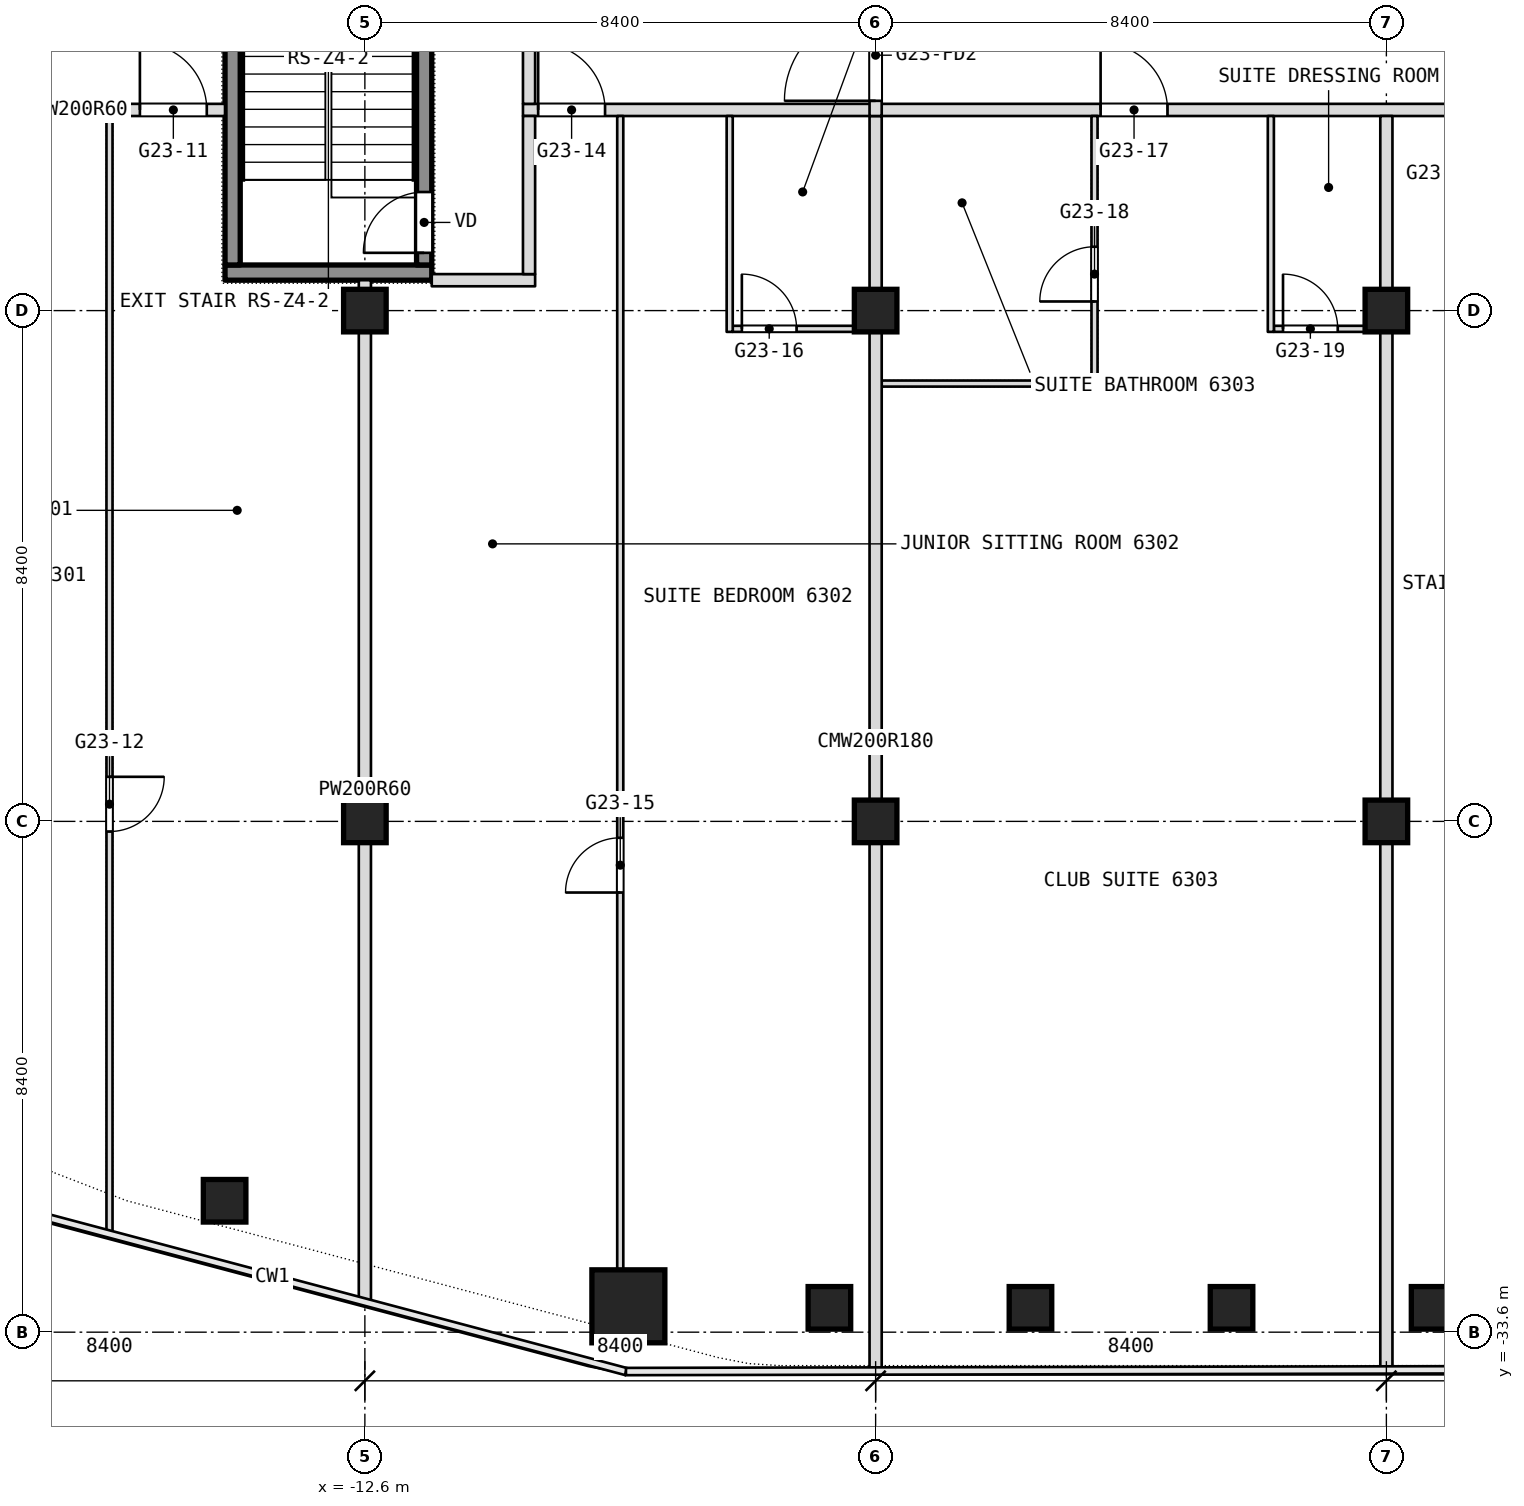
"""IFC4 building model, lengths in metres.
Left out: names, types, materials, properties, quantities, classifications, styles, units other than length and angle.
Written with IfcOpenShell. Run it as: python <this file> out.ifc"""

import sys

from ifc_helpers import new_model, si_unit, direction, frame, frame_2d, origin, origin_2d, place, context, subcontext, project, spatial, rectangle, extrude, element, fill, save


model = new_model("IFC4")
c1 = context("Model", 3, precision=1e-05, world=origin(), true_north=direction((0.0, 1.0)))
c2 = subcontext(c1, "Body", "Model", "MODEL_VIEW")
j1 = project(units=[si_unit("LENGTHUNIT", "METRE"), si_unit("PLANEANGLEUNIT", "RADIAN")], contexts=[c1])
p1 = place(None, origin())
s1 = spatial("IfcSite", under=j1, at=p1, CompositionType="ELEMENT")
p2 = place(p1, origin())
s2 = spatial("IfcBuilding", under=s1, at=p2, CompositionType="ELEMENT")
p3 = place(p2, frame((0.0, 0.0, 274.1)))
s3 = spatial("IfcBuildingStorey", under=s2, at=p3, CompositionType="ELEMENT", Elevation=274.1)
p4 = place(p3, frame((-8.266, -33.175, 0.0), z_axis=(0.0, 0.0, 1.0), x_axis=(1.0, 0.0, 0.0)))
e1 = element("IfcColumn", 1, at=p4, inside=s3, PredefinedType="COLUMN", context=c2, shape_type="SweptSolid", body=[
    extrude(rectangle(XDim=1.2, YDim=1.2, at=origin_2d()), origin(), (0.0, 0.0, 1.0), 3.6),
])
for number, where, z_axis, x_axis in (
    (2, (-12.6, -25.2, 0.0), (0.0, 0.0, 1.0), (1.0, 0.0, 0.0)),
    (3, (-12.6, -16.8, 0.0), (0.0, 0.0, 1.0), (1.0, 0.0, 0.0)),
    (4, (-4.2, -25.2, 0.0), (0.0, 0.0, 1.0), (1.0, 0.0, 0.0)),
    (5, (-4.2, -16.8, 0.0), (0.0, 0.0, 1.0), (1.0, 0.0, 0.0)),
    (6, (4.2, -25.2, 0.0), (0.0, 0.0, 1.0), (1.0, 0.0, 0.0)),
    (7, (4.2, -16.8, 0.0), (0.0, 0.0, 1.0), (1.0, 0.0, 0.0)),
    (8, (4.96, -33.2, 0.0), (0.0, 0.0, 1.0), (1.0, 0.0, 0.0)),
    (9, (1.653, -33.2, 0.0), (0.0, 0.0, 1.0), (1.0, 0.0, 0.0)),
    (10, (-1.653, -33.2, 0.0), (0.0, 0.0, 1.0), (1.0, 0.0, 0.0)),
    (11, (-4.96, -33.2, 0.0), (0.0, 0.0, 1.0), (1.0, 0.0, 0.0)),
    (12, (-14.907, -31.439, 0.0), (0.0, 0.0, 1.0), (1.0, 0.0, 0.0)),
):
    element("IfcColumn", number, at=place(p3, frame(where, z_axis=z_axis, x_axis=x_axis)), inside=s3, PredefinedType="COLUMN", context=c2, shape_type="SweptSolid", body=[
        extrude(rectangle(XDim=0.7, YDim=0.7, at=origin_2d()), origin(), (0.0, 0.0, 1.0), 3.6),
    ])
p5 = place(p3, frame((-4.1, -18.0, 0.0), z_axis=(0.0, 0.0, 1.0), x_axis=(1.0, 0.0, 0.0)))
e13 = element("IfcWall", 13, at=p5, inside=s3, PredefinedType="PARTITIONING", context=c2, shape_type="SweptSolid", body=[
    extrude(rectangle(XDim=3.55, YDim=0.1, at=frame_2d((1.775, 0.0))), origin(), (0.0, 0.0, 1.0), 3.34),
])
p6 = place(p3, frame((-6.55, -17.1, 0.0), z_axis=(0.0, 0.0, 1.0), x_axis=(1.0, 0.0, 0.0)))
e14 = element("IfcWall", 14, at=p6, inside=s3, PredefinedType="PARTITIONING", context=c2, shape_type="SweptSolid", body=[
    extrude(rectangle(XDim=2.45, YDim=0.1, at=frame_2d((1.225, 0.0))), origin(), (0.0, 0.0, 1.0), 3.34),
])
p7 = place(p6, frame((0.15, 0.0, 0.0)))
e15 = element("IfcOpeningElement", 15, at=p7, cuts=e14, PredefinedType="OPENING", context=c2, shape_type="SweptSolid", body=[
    extrude(rectangle(XDim=0.9, YDim=2.1, at=frame_2d((0.45, 1.05))), frame((0.0, 0.05, 0.0), z_axis=(0.0, -1.0, 0.0), x_axis=(1.0, 0.0, 0.0)), (0.0, 0.0, 1.0), 0.1),
])
p8 = place(p3, frame((2.35, -17.1, 0.0), z_axis=(0.0, 0.0, 1.0), x_axis=(1.0, 0.0, 0.0)))
e16 = element("IfcWall", 16, at=p8, inside=s3, PredefinedType="PARTITIONING", context=c2, shape_type="SweptSolid", body=[
    extrude(rectangle(XDim=1.95, YDim=0.1, at=frame_2d((0.975, 0.0))), origin(), (0.0, 0.0, 1.0), 3.34),
])
p9 = place(p8, frame((0.15, 0.0, 0.0)))
e17 = element("IfcOpeningElement", 17, at=p9, cuts=e16, PredefinedType="OPENING", context=c2, shape_type="SweptSolid", body=[
    extrude(rectangle(XDim=0.9, YDim=2.1, at=frame_2d((0.45, 1.05))), frame((0.0, 0.05, 0.0), z_axis=(0.0, -1.0, 0.0), x_axis=(1.0, 0.0, 0.0)), (0.0, 0.0, 1.0), 0.1),
])
p10 = place(p3, frame((-11.5, -16.3, 0.0), z_axis=(0.0, 0.0, 1.0), x_axis=(1.0, 0.0, 0.0)))
e18 = element("IfcWall", 18, at=p10, inside=s3, PredefinedType="PARTITIONING", context=c2, shape_type="SweptSolid", body=[
    extrude(rectangle(XDim=1.7, YDim=0.2, at=frame_2d((0.85, 0.0))), origin(), (0.0, 0.0, 1.0), 3.34),
])
p11 = place(p3, frame((-21.0, -13.5, 0.0), z_axis=(0.0, 0.0, 1.0), x_axis=(1.0, 0.0, 0.0)))
e19 = element("IfcWall", 19, at=p11, inside=s3, PredefinedType="PARTITIONING", context=c2, shape_type="SweptSolid", body=[
    extrude(rectangle(XDim=6.1, YDim=0.2, at=frame_2d((3.05, 0.0))), origin(), (0.0, 0.0, 1.0), 3.34),
])
p12 = place(p11, frame((4.7, 0.0, 0.0)))
e20 = element("IfcOpeningElement", 20, at=p12, cuts=e19, PredefinedType="OPENING", context=c2, shape_type="SweptSolid", body=[
    extrude(rectangle(XDim=1.1, YDim=2.1, at=frame_2d((0.55, 1.05))), frame((0.0, 0.1, 0.0), z_axis=(0.0, -1.0, 0.0), x_axis=(1.0, 0.0, 0.0)), (0.0, 0.0, 1.0), 0.2),
])
p13 = place(p3, frame((-10.0, -13.5, 0.0), z_axis=(0.0, 0.0, 1.0), x_axis=(1.0, 0.0, 0.0)))
e21 = element("IfcWall", 21, at=p13, inside=s3, PredefinedType="PARTITIONING", context=c2, shape_type="SweptSolid", body=[
    extrude(rectangle(XDim=16.0, YDim=0.2, at=frame_2d((8.0, 0.0))), origin(), (0.0, 0.0, 1.0), 3.34),
])
p14 = place(p13, frame((0.25, 0.0, 0.0)))
e22 = element("IfcOpeningElement", 22, at=p14, cuts=e21, PredefinedType="OPENING", context=c2, shape_type="SweptSolid", body=[
    extrude(rectangle(XDim=1.1, YDim=2.1, at=frame_2d((0.55, 1.05))), frame((0.0, 0.1, 0.0), z_axis=(0.0, -1.0, 0.0), x_axis=(1.0, 0.0, 0.0)), (0.0, 0.0, 1.0), 0.2),
])
p15 = place(p13, frame((9.5, 0.0, 0.0)))
e23 = element("IfcOpeningElement", 23, at=p15, cuts=e21, PredefinedType="OPENING", context=c2, shape_type="SweptSolid", body=[
    extrude(rectangle(XDim=1.1, YDim=2.1, at=frame_2d((0.55, 1.05))), frame((0.0, 0.1, 0.0), z_axis=(0.0, -1.0, 0.0), x_axis=(1.0, 0.0, 0.0)), (0.0, 0.0, 1.0), 0.2),
])
p16 = place(p3, frame((4.2, -34.2, 0.0), z_axis=(0.0, 0.0, 1.0), x_axis=(0.0, 1.0, 0.0)))
e24 = element("IfcWall", 24, at=p16, inside=s3, PredefinedType="PARTITIONING", context=c2, shape_type="SweptSolid", body=[
    extrude(rectangle(XDim=20.6, YDim=0.2, at=frame_2d((10.3, 0.0))), origin(), (0.0, 0.0, 1.0), 3.34),
])
p17 = place(p3, frame((2.3, -17.15, 0.0), z_axis=(0.0, 0.0, 1.0), x_axis=(0.0, 1.0, 0.0)))
e25 = element("IfcWall", 25, at=p17, inside=s3, PredefinedType="PARTITIONING", context=c2, shape_type="SweptSolid", body=[
    extrude(rectangle(XDim=3.55, YDim=0.1, at=frame_2d((1.775, 0.0))), origin(), (0.0, 0.0, 1.0), 3.34),
])
p18 = place(p3, frame((-0.6, -17.95, 0.0), z_axis=(0.0, 0.0, 1.0), x_axis=(0.0, 1.0, 0.0)))
e26 = element("IfcWall", 26, at=p18, inside=s3, PredefinedType="PARTITIONING", context=c2, shape_type="SweptSolid", body=[
    extrude(rectangle(XDim=4.35, YDim=0.1, at=frame_2d((2.175, 0.0))), origin(), (0.0, 0.0, 1.0), 3.34),
])
p19 = place(p18, frame((1.3, 0.0, 0.0)))
e27 = element("IfcOpeningElement", 27, at=p19, cuts=e26, PredefinedType="OPENING", context=c2, shape_type="SweptSolid", body=[
    extrude(rectangle(XDim=0.9, YDim=2.1, at=frame_2d((0.45, 1.05))), frame((0.0, 0.05, 0.0), z_axis=(0.0, -1.0, 0.0), x_axis=(1.0, 0.0, 0.0)), (0.0, 0.0, 1.0), 0.1),
])
p20 = place(p3, frame((-4.2, -34.2, 0.0), z_axis=(0.0, 0.0, 1.0), x_axis=(0.0, 1.0, 0.0)))
e28 = element("IfcWall", 28, at=p20, inside=s3, PredefinedType="PARTITIONING", context=c2, shape_type="SweptSolid", body=[
    extrude(rectangle(XDim=20.6, YDim=0.2, at=frame_2d((10.3, 0.0))), origin(), (0.0, 0.0, 1.0), 3.34),
])
p21 = place(p3, frame((-4.2, -13.6, 0.0), z_axis=(0.0, 0.0, 1.0), x_axis=(0.0, 1.0, 0.0)))
e29 = element("IfcWall", 29, at=p21, inside=s3, PredefinedType="PARTITIONING", context=c2, shape_type="SweptSolid", body=[
    extrude(rectangle(XDim=13.6, YDim=0.2, at=frame_2d((6.8, 0.0))), origin(), (0.0, 0.0, 1.0), 3.34),
])
p22 = place(p21, frame((11.95, 0.0, 0.0)))
e30 = element("IfcOpeningElement", 30, at=p22, cuts=e29, PredefinedType="OPENING", context=c2, shape_type="SweptSolid", body=[
    extrude(rectangle(XDim=1.5, YDim=2.1, at=frame_2d((0.75, 1.05))), frame((0.0, 0.1, 0.0), z_axis=(0.0, -1.0, 0.0), x_axis=(1.0, 0.0, 0.0)), (0.0, 0.0, 1.0), 0.2),
])
p23 = place(p21, frame((0.25, 0.0, 0.0)))
e31 = element("IfcOpeningElement", 31, at=p23, cuts=e29, PredefinedType="OPENING", context=c2, shape_type="SweptSolid", body=[
    extrude(rectangle(XDim=1.5, YDim=2.1, at=frame_2d((0.75, 1.05))), frame((0.0, 0.1, 0.0), z_axis=(0.0, -1.0, 0.0), x_axis=(1.0, 0.0, 0.0)), (0.0, 0.0, 1.0), 0.2),
])
p24 = place(p3, frame((-6.6, -17.15, 0.0), z_axis=(0.0, 0.0, 1.0), x_axis=(0.0, 1.0, 0.0)))
e32 = element("IfcWall", 32, at=p24, inside=s3, PredefinedType="PARTITIONING", context=c2, shape_type="SweptSolid", body=[
    extrude(rectangle(XDim=3.55, YDim=0.1, at=frame_2d((1.775, 0.0))), origin(), (0.0, 0.0, 1.0), 3.34),
])
p25 = place(p3, frame((-8.4, -32.575, 0.0), z_axis=(0.0, 0.0, 1.0), x_axis=(0.0, 1.0, 0.0)))
e33 = element("IfcWall", 33, at=p25, inside=s3, PredefinedType="PARTITIONING", context=c2, shape_type="SweptSolid", body=[
    extrude(rectangle(XDim=18.975, YDim=0.1, at=frame_2d((9.487, 0.0))), origin(), (0.0, 0.0, 1.0), 3.34),
])
p26 = place(p25, frame((6.205, 0.0, 0.0)))
e34 = element("IfcOpeningElement", 34, at=p26, cuts=e33, PredefinedType="OPENING", context=c2, shape_type="SweptSolid", body=[
    extrude(rectangle(XDim=0.9, YDim=2.1, at=frame_2d((0.45, 1.05))), frame((0.0, 0.05, 0.0), z_axis=(0.0, -1.0, 0.0), x_axis=(1.0, 0.0, 0.0)), (0.0, 0.0, 1.0), 0.1),
])
p27 = place(p3, frame((-9.9, -16.2, 0.0), z_axis=(0.0, 0.0, 1.0), x_axis=(0.0, 1.0, 0.0)))
e35 = element("IfcWall", 35, at=p27, inside=s3, PredefinedType="PARTITIONING", context=c2, shape_type="SweptSolid", body=[
    extrude(rectangle(XDim=2.6, YDim=0.2, at=frame_2d((1.3, 0.0))), origin(), (0.0, 0.0, 1.0), 3.34),
])
p28 = place(p3, frame((-9.9, -13.4, 0.0), z_axis=(0.0, 0.0, 1.0), x_axis=(0.0, 1.0, 0.0)))
e36 = element("IfcWall", 36, at=p28, inside=s3, PredefinedType="PARTITIONING", context=c2, shape_type="SweptSolid", body=[
    extrude(rectangle(XDim=3.4, YDim=0.2, at=frame_2d((1.7, 0.0))), origin(), (0.0, 0.0, 1.0), 3.34),
])
p29 = place(p3, frame((-12.6, -33.075, 0.0), z_axis=(0.0, 0.0, 1.0), x_axis=(0.0, 1.0, 0.0)))
e37 = element("IfcWall", 37, at=p29, inside=s3, PredefinedType="PARTITIONING", context=c2, shape_type="SweptSolid", body=[
    extrude(rectangle(XDim=16.775, YDim=0.2, at=frame_2d((8.387, 0.0))), origin(), (0.0, 0.0, 1.0), 3.34),
])
p30 = place(p3, frame((-16.8, -31.957, 0.0), z_axis=(0.0, 0.0, 1.0), x_axis=(0.0, 1.0, 0.0)))
e38 = element("IfcWall", 38, at=p30, inside=s3, PredefinedType="PARTITIONING", context=c2, shape_type="SweptSolid", body=[
    extrude(rectangle(XDim=18.357, YDim=0.1, at=frame_2d((9.178, 0.0))), origin(), (0.0, 0.0, 1.0), 3.34),
])
p31 = place(p30, frame((6.59, 0.0, 0.0)))
e39 = element("IfcOpeningElement", 39, at=p31, cuts=e38, PredefinedType="OPENING", context=c2, shape_type="SweptSolid", body=[
    extrude(rectangle(XDim=0.9, YDim=2.1, at=frame_2d((0.45, 1.05))), frame((0.0, 0.05, 0.0), z_axis=(0.0, -1.0, 0.0), x_axis=(1.0, 0.0, 0.0)), (0.0, 0.0, 1.0), 0.1),
])
p32 = place(p3, frame((-14.9, -16.175, 0.1), z_axis=(0.0, 0.0, 1.0), x_axis=(1.0, 0.0, 0.0)))
e40 = element("IfcWall", 40, at=p32, inside=s3, PredefinedType="SHEAR", context=c2, shape_type="SweptSolid", body=[
    extrude(rectangle(XDim=3.4, YDim=0.25, at=frame_2d((1.7, 0.0))), origin(), (0.0, 0.0, 1.0), 3.6),
])
p33 = place(p3, frame((-14.775, -16.05, 0.1), z_axis=(0.0, 0.0, 1.0), x_axis=(0.0, 1.0, 0.0)))
e41 = element("IfcWall", 41, at=p33, inside=s3, PredefinedType="SHEAR", context=c2, shape_type="SweptSolid", body=[
    extrude(rectangle(XDim=5.7, YDim=0.25, at=frame_2d((2.85, 0.0))), origin(), (0.0, 0.0, 1.0), 3.6),
])
p34 = place(p3, frame((-11.625, -16.05, 0.1), z_axis=(0.0, 0.0, 1.0), x_axis=(0.0, 1.0, 0.0)))
e42 = element("IfcWall", 42, at=p34, inside=s3, PredefinedType="SHEAR", context=c2, shape_type="SweptSolid", body=[
    extrude(rectangle(XDim=5.7, YDim=0.25, at=frame_2d((2.85, 0.0))), origin(), (0.0, 0.0, 1.0), 3.6),
])
p35 = place(p34, frame((0.2, 0.0, 0.0)))
e43 = element("IfcOpeningElement", 43, at=p35, cuts=e42, PredefinedType="OPENING", context=c2, shape_type="SweptSolid", body=[
    extrude(rectangle(XDim=1.0, YDim=2.1, at=frame_2d((0.5, 1.05))), frame((0.0, 0.125, 0.0), z_axis=(0.0, -1.0, 0.0), x_axis=(1.0, 0.0, 0.0)), (0.0, 0.0, 1.0), 0.25),
])
p36 = place(p7, origin())
e44 = element("IfcDoor", 44, at=p36, inside=s3, OperationType="SINGLE_SWING_LEFT", PredefinedType="DOOR", context=c2, shape_type="SweptSolid", body=[
    extrude(rectangle(XDim=0.9, YDim=2.1, at=frame_2d((0.45, 1.05))), frame((0.0, 0.025, 0.0), z_axis=(0.0, -1.0, 0.0), x_axis=(1.0, 0.0, 0.0)), (0.0, 0.0, 1.0), 0.05),
])
fill(e15, e44)
p37 = place(p9, origin())
e45 = element("IfcDoor", 45, at=p37, inside=s3, OperationType="SINGLE_SWING_LEFT", PredefinedType="DOOR", context=c2, shape_type="SweptSolid", body=[
    extrude(rectangle(XDim=0.9, YDim=2.1, at=frame_2d((0.45, 1.05))), frame((0.0, 0.025, 0.0), z_axis=(0.0, -1.0, 0.0), x_axis=(1.0, 0.0, 0.0)), (0.0, 0.0, 1.0), 0.05),
])
fill(e17, e45)
p38 = place(p12, origin())
e46 = element("IfcDoor", 46, at=p38, inside=s3, OperationType="SINGLE_SWING_RIGHT", PredefinedType="DOOR", context=c2, shape_type="SweptSolid", body=[
    extrude(rectangle(XDim=1.1, YDim=2.1, at=frame_2d((0.55, 1.05))), frame((0.0, 0.025, 0.0), z_axis=(0.0, -1.0, 0.0), x_axis=(1.0, 0.0, 0.0)), (0.0, 0.0, 1.0), 0.05),
])
fill(e20, e46)
p39 = place(p14, origin())
e47 = element("IfcDoor", 47, at=p39, inside=s3, OperationType="SINGLE_SWING_RIGHT", PredefinedType="DOOR", context=c2, shape_type="SweptSolid", body=[
    extrude(rectangle(XDim=1.1, YDim=2.1, at=frame_2d((0.55, 1.05))), frame((0.0, 0.025, 0.0), z_axis=(0.0, -1.0, 0.0), x_axis=(1.0, 0.0, 0.0)), (0.0, 0.0, 1.0), 0.05),
])
fill(e22, e47)
p40 = place(p15, origin())
e48 = element("IfcDoor", 48, at=p40, inside=s3, OperationType="SINGLE_SWING_RIGHT", PredefinedType="DOOR", context=c2, shape_type="SweptSolid", body=[
    extrude(rectangle(XDim=1.1, YDim=2.1, at=frame_2d((0.55, 1.05))), frame((0.0, 0.025, 0.0), z_axis=(0.0, -1.0, 0.0), x_axis=(1.0, 0.0, 0.0)), (0.0, 0.0, 1.0), 0.05),
])
fill(e23, e48)
p41 = place(p19, origin())
e49 = element("IfcDoor", 49, at=p41, inside=s3, OperationType="SINGLE_SWING_LEFT", PredefinedType="DOOR", context=c2, shape_type="SweptSolid", body=[
    extrude(rectangle(XDim=0.9, YDim=2.1, at=frame_2d((0.45, 1.05))), frame((0.0, 0.025, 0.0), z_axis=(0.0, -1.0, 0.0), x_axis=(1.0, 0.0, 0.0)), (0.0, 0.0, 1.0), 0.05),
])
fill(e27, e49)
p42 = place(p26, origin())
e50 = element("IfcDoor", 50, at=p42, inside=s3, OperationType="SINGLE_SWING_LEFT", PredefinedType="DOOR", context=c2, shape_type="SweptSolid", body=[
    extrude(rectangle(XDim=0.9, YDim=2.1, at=frame_2d((0.45, 1.05))), frame((0.0, 0.025, 0.0), z_axis=(0.0, -1.0, 0.0), x_axis=(1.0, 0.0, 0.0)), (0.0, 0.0, 1.0), 0.05),
])
fill(e34, e50)
p43 = place(p31, origin())
e51 = element("IfcDoor", 51, at=p43, inside=s3, OperationType="SINGLE_SWING_LEFT", PredefinedType="DOOR", context=c2, shape_type="SweptSolid", body=[
    extrude(rectangle(XDim=0.9, YDim=2.1, at=frame_2d((0.45, 1.05))), frame((0.0, 0.025, 0.0), z_axis=(0.0, -1.0, 0.0), x_axis=(1.0, 0.0, 0.0)), (0.0, 0.0, 1.0), 0.05),
])
fill(e39, e51)
p44 = place(p35, origin())
e52 = element("IfcDoor", 52, at=p44, inside=s3, OperationType="SINGLE_SWING_LEFT", PredefinedType="DOOR", context=c2, shape_type="SweptSolid", body=[
    extrude(rectangle(XDim=1.0, YDim=2.1, at=frame_2d((0.5, 1.05))), frame((0.0, 0.025, 0.0), z_axis=(0.0, -1.0, 0.0), x_axis=(1.0, 0.0, 0.0)), (0.0, 0.0, 1.0), 0.05),
])
fill(e43, e52)
p45 = place(p23, origin())
e53 = element("IfcDoor", 53, at=p45, inside=s3, OperationType="DOUBLE_DOOR_DOUBLE_SWING", PredefinedType="DOOR", context=c2, shape_type="SweptSolid", body=[
    extrude(rectangle(XDim=1.5, YDim=2.1, at=frame_2d((0.75, 1.05))), frame((0.0, 0.025, 0.0), z_axis=(0.0, -1.0, 0.0), x_axis=(1.0, 0.0, 0.0)), (0.0, 0.0, 1.0), 0.05),
])
fill(e31, e53)
save(model, sys.argv[1])
